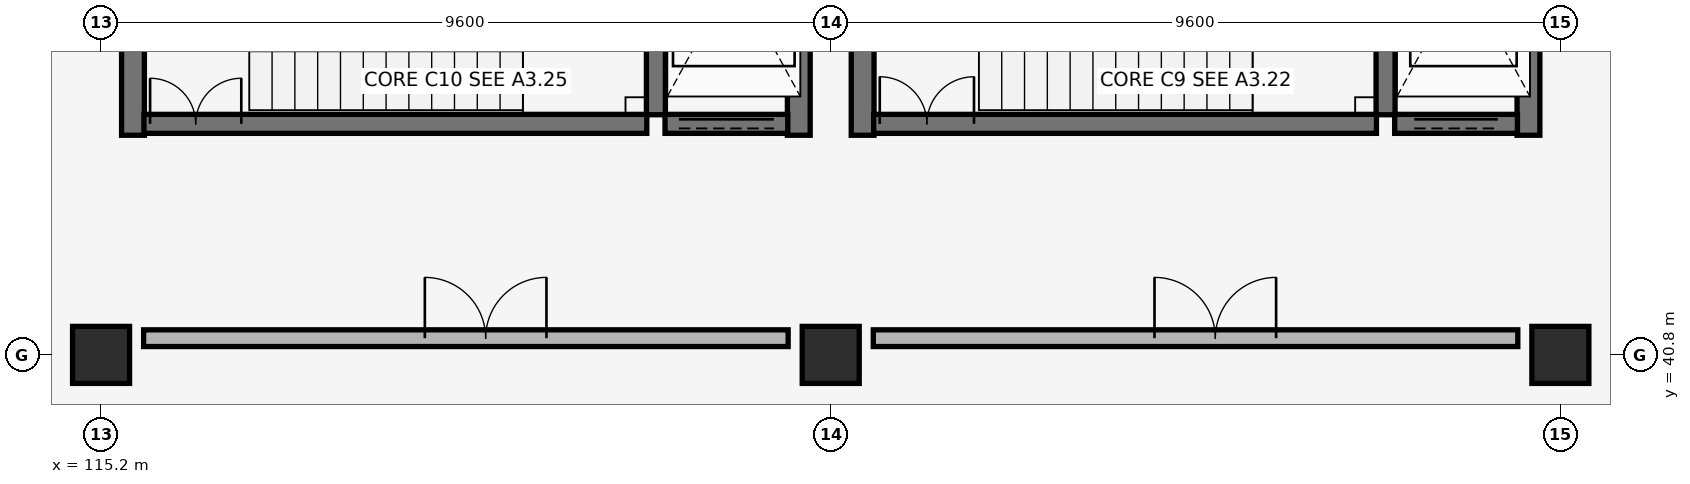
"""IFC4 building model, lengths in metres.
Left out: names, types, materials, properties, quantities, classifications, styles, units other than length and angle.
Written with IfcOpenShell. Run it as: python <this file> out.ifc"""

import sys

from ifc_helpers import new_model, si_unit, direction, frame, frame_2d, origin, origin_2d, place, context, subcontext, project, spatial, rectangle, circle, extrude, element, fill, save


model = new_model("IFC4")
c1 = context("Model", 3, precision=1e-05, world=origin(), true_north=direction((0.0, 1.0)))
c2 = subcontext(c1, "Body", "Model", "MODEL_VIEW")
j1 = project(units=[si_unit("LENGTHUNIT", "METRE"), si_unit("PLANEANGLEUNIT", "RADIAN")], contexts=[c1])
p1 = place(None, origin())
s1 = spatial("IfcSite", under=j1, at=p1, CompositionType="ELEMENT")
p2 = place(p1, origin())
s2 = spatial("IfcBuilding", under=s1, at=p2, CompositionType="ELEMENT")
p3 = place(p2, origin())
s3 = spatial("IfcBuildingStorey", under=s2, at=p3, CompositionType="ELEMENT", Elevation=0.0)
for number, where, z_axis, x_axis in (
    (1, (115.2, 40.8, -0.44), (0.0, 0.0, 1.0), (1.0, 0.0, 0.0)),
    (2, (124.8, 40.8, -0.44), (0.0, 0.0, 1.0), (1.0, 0.0, 0.0)),
    (3, (134.4, 40.8, -0.44), (0.0, 0.0, 1.0), (1.0, 0.0, 0.0)),
):
    element("IfcColumn", number, at=place(p3, frame(where, z_axis=z_axis, x_axis=x_axis)), inside=s3, PredefinedType="COLUMN", context=c2, shape_type="SweptSolid", body=[
        extrude(circle(Radius=0.375, at=origin_2d()), origin(), (0.0, 0.0, 1.0), 4.86),
    ])
for number, where, z_axis, x_axis in (
    (4, (125.22, 43.69, 0.0), (0.0, 0.0, 1.0), (0.0, 1.0, 0.0)),
    (5, (133.98, 43.69, 0.0), (0.0, 0.0, 1.0), (0.0, 1.0, 0.0)),
):
    element("IfcWall", number, at=place(p3, frame(where, z_axis=z_axis, x_axis=x_axis)), inside=s3, PredefinedType="SHEAR", context=c2, shape_type="SweptSolid", body=[
        extrude(rectangle(XDim=4.1, YDim=0.3, at=frame_2d((2.05, 0.0))), origin(), (0.0, 0.0, 1.0), 4.12),
    ])
p4 = place(p3, frame((132.1, 43.96, 0.0), z_axis=(0.0, 0.0, 1.0), x_axis=(0.0, 1.0, 0.0)))
e6 = element("IfcWall", 6, at=p4, inside=s3, PredefinedType="SHEAR", context=c2, shape_type="SweptSolid", body=[
    extrude(rectangle(XDim=3.53, YDim=0.25, at=frame_2d((1.765, 0.0))), origin(), (0.0, 0.0, 1.0), 4.12),
])
p5 = place(p3, frame((125.365, 43.84, 0.0), z_axis=(0.0, 0.0, 1.0), x_axis=(1.0, 0.0, 0.0)))
e7 = element("IfcWall", 7, at=p5, inside=s3, PredefinedType="SHEAR", context=c2, shape_type="SweptSolid", body=[
    extrude(rectangle(XDim=6.615, YDim=0.25, at=frame_2d((3.308, 0.0))), origin(), (0.0, 0.0, 1.0), 4.12),
])
p6 = place(p5, frame((0.08, 0.0, 0.0)))
e8 = element("IfcOpeningElement", 8, at=p6, cuts=e7, PredefinedType="OPENING", context=c2, shape_type="SweptSolid", body=[
    extrude(rectangle(XDim=1.24, YDim=2.15, at=frame_2d((0.62, 1.075))), frame((0.0, 0.135, 0.0), z_axis=(0.0, -1.0, 0.0), x_axis=(1.0, 0.0, 0.0)), (0.0, 0.0, 1.0), 0.27),
])
p7 = place(p3, frame((125.36, 41.02, 0.0), z_axis=(0.0, 0.0, 1.0), x_axis=(1.0, 0.0, 0.0)))
e9 = element("IfcWall", 9, at=p7, inside=s3, PredefinedType="PARTITIONING", context=c2, shape_type="SweptSolid", body=[
    extrude(rectangle(XDim=8.48, YDim=0.22, at=frame_2d((4.24, 0.0))), origin(), (0.0, 0.0, 1.0), 3.4),
])
p8 = place(p7, frame((3.7, 0.0, 0.0)))
e10 = element("IfcOpeningElement", 10, at=p8, cuts=e9, PredefinedType="OPENING", context=c2, shape_type="SweptSolid", body=[
    extrude(rectangle(XDim=1.6, YDim=2.2, at=frame_2d((0.8, 1.1))), frame((0.0, 0.12, 0.0), z_axis=(0.0, -1.0, 0.0), x_axis=(1.0, 0.0, 0.0)), (0.0, 0.0, 1.0), 0.24),
])
p9 = place(p3, frame((132.22, 43.84, 0.0), z_axis=(0.0, 0.0, 1.0), x_axis=(1.0, 0.0, 0.0)))
e11 = element("IfcWall", 11, at=p9, inside=s3, PredefinedType="SHEAR", context=c2, shape_type="SweptSolid", body=[
    extrude(rectangle(XDim=1.615, YDim=0.25, at=frame_2d((0.808, 0.0))), origin(), (0.0, 0.0, 1.0), 4.12),
])
p10 = place(p9, frame((0.258, 0.0, 0.0)))
e12 = element("IfcOpeningElement", 12, at=p10, cuts=e11, PredefinedType="OPENING", context=c2, shape_type="SweptSolid", body=[
    extrude(rectangle(XDim=1.1, YDim=2.15, at=frame_2d((0.55, 1.075))), frame((0.0, 0.135, 0.0), z_axis=(0.0, -1.0, 0.0), x_axis=(1.0, 0.0, 0.0)), (0.0, 0.0, 1.0), 0.27),
])
for number, where, z_axis, x_axis in (
    (13, (115.62, 43.69, 0.0), (0.0, 0.0, 1.0), (0.0, 1.0, 0.0)),
    (14, (124.38, 43.69, 0.0), (0.0, 0.0, 1.0), (0.0, 1.0, 0.0)),
):
    element("IfcWall", number, at=place(p3, frame(where, z_axis=z_axis, x_axis=x_axis)), inside=s3, PredefinedType="SHEAR", context=c2, shape_type="SweptSolid", body=[
        extrude(rectangle(XDim=4.1, YDim=0.3, at=frame_2d((2.05, 0.0))), origin(), (0.0, 0.0, 1.0), 4.12),
    ])
p11 = place(p3, frame((122.5, 43.96, 0.0), z_axis=(0.0, 0.0, 1.0), x_axis=(0.0, 1.0, 0.0)))
e15 = element("IfcWall", 15, at=p11, inside=s3, PredefinedType="SHEAR", context=c2, shape_type="SweptSolid", body=[
    extrude(rectangle(XDim=3.53, YDim=0.25, at=frame_2d((1.765, 0.0))), origin(), (0.0, 0.0, 1.0), 4.12),
])
p12 = place(p3, frame((115.765, 43.84, 0.0), z_axis=(0.0, 0.0, 1.0), x_axis=(1.0, 0.0, 0.0)))
e16 = element("IfcWall", 16, at=p12, inside=s3, PredefinedType="SHEAR", context=c2, shape_type="SweptSolid", body=[
    extrude(rectangle(XDim=6.615, YDim=0.25, at=frame_2d((3.308, 0.0))), origin(), (0.0, 0.0, 1.0), 4.12),
])
p13 = place(p12, frame((0.08, 0.0, 0.0)))
e17 = element("IfcOpeningElement", 17, at=p13, cuts=e16, PredefinedType="OPENING", context=c2, shape_type="SweptSolid", body=[
    extrude(rectangle(XDim=1.2, YDim=2.15, at=frame_2d((0.6, 1.075))), frame((0.0, 0.135, 0.0), z_axis=(0.0, -1.0, 0.0), x_axis=(1.0, 0.0, 0.0)), (0.0, 0.0, 1.0), 0.27),
])
p14 = place(p3, frame((115.76, 41.02, 0.0), z_axis=(0.0, 0.0, 1.0), x_axis=(1.0, 0.0, 0.0)))
e18 = element("IfcWall", 18, at=p14, inside=s3, PredefinedType="PARTITIONING", context=c2, shape_type="SweptSolid", body=[
    extrude(rectangle(XDim=8.48, YDim=0.22, at=frame_2d((4.24, 0.0))), origin(), (0.0, 0.0, 1.0), 3.4),
])
p15 = place(p14, frame((3.7, 0.0, 0.0)))
e19 = element("IfcOpeningElement", 19, at=p15, cuts=e18, PredefinedType="OPENING", context=c2, shape_type="SweptSolid", body=[
    extrude(rectangle(XDim=1.6, YDim=2.2, at=frame_2d((0.8, 1.1))), frame((0.0, 0.12, 0.0), z_axis=(0.0, -1.0, 0.0), x_axis=(1.0, 0.0, 0.0)), (0.0, 0.0, 1.0), 0.24),
])
p16 = place(p3, frame((122.62, 43.84, 0.0), z_axis=(0.0, 0.0, 1.0), x_axis=(1.0, 0.0, 0.0)))
e20 = element("IfcWall", 20, at=p16, inside=s3, PredefinedType="SHEAR", context=c2, shape_type="SweptSolid", body=[
    extrude(rectangle(XDim=1.615, YDim=0.25, at=frame_2d((0.808, 0.0))), origin(), (0.0, 0.0, 1.0), 4.12),
])
p17 = place(p16, frame((0.183, 0.0, 0.0)))
e21 = element("IfcOpeningElement", 21, at=p17, cuts=e20, PredefinedType="OPENING", context=c2, shape_type="SweptSolid", body=[
    extrude(rectangle(XDim=1.25, YDim=2.15, at=frame_2d((0.625, 1.075))), frame((0.0, 0.135, 0.0), z_axis=(0.0, -1.0, 0.0), x_axis=(1.0, 0.0, 0.0)), (0.0, 0.0, 1.0), 0.27),
])
p18 = place(p6, origin())
e22 = element("IfcDoor", 22, at=p18, inside=s3, OperationType="DOUBLE_DOOR_SINGLE_SWING", PredefinedType="DOOR", context=c2, shape_type="SweptSolid", body=[
    extrude(rectangle(XDim=1.24, YDim=2.15, at=frame_2d((0.62, 1.075))), frame((0.0, 0.025, 0.0), z_axis=(0.0, -1.0, 0.0), x_axis=(1.0, 0.0, 0.0)), (0.0, 0.0, 1.0), 0.05),
])
fill(e8, e22)
p19 = place(p8, origin())
e23 = element("IfcDoor", 23, at=p19, inside=s3, OperationType="DOUBLE_DOOR_SINGLE_SWING", PredefinedType="DOOR", context=c2, shape_type="SweptSolid", body=[
    extrude(rectangle(XDim=1.6, YDim=2.2, at=frame_2d((0.8, 1.1))), frame((0.0, 0.025, 0.0), z_axis=(0.0, -1.0, 0.0), x_axis=(1.0, 0.0, 0.0)), (0.0, 0.0, 1.0), 0.05),
])
fill(e10, e23)
p20 = place(p10, origin())
e24 = element("IfcDoor", 24, at=p20, inside=s3, OperationType="DOUBLE_DOOR_SLIDING", PredefinedType="DOOR", context=c2, shape_type="SweptSolid", body=[
    extrude(rectangle(XDim=1.1, YDim=2.15, at=frame_2d((0.55, 1.075))), frame((0.0, 0.025, 0.0), z_axis=(0.0, -1.0, 0.0), x_axis=(1.0, 0.0, 0.0)), (0.0, 0.0, 1.0), 0.05),
])
fill(e12, e24)
p21 = place(p13, origin())
e25 = element("IfcDoor", 25, at=p21, inside=s3, OperationType="DOUBLE_DOOR_SINGLE_SWING", PredefinedType="DOOR", context=c2, shape_type="SweptSolid", body=[
    extrude(rectangle(XDim=1.2, YDim=2.15, at=frame_2d((0.6, 1.075))), frame((0.0, 0.025, 0.0), z_axis=(0.0, -1.0, 0.0), x_axis=(1.0, 0.0, 0.0)), (0.0, 0.0, 1.0), 0.05),
])
fill(e17, e25)
p22 = place(p15, origin())
e26 = element("IfcDoor", 26, at=p22, inside=s3, OperationType="DOUBLE_DOOR_SINGLE_SWING", PredefinedType="DOOR", context=c2, shape_type="SweptSolid", body=[
    extrude(rectangle(XDim=1.6, YDim=2.2, at=frame_2d((0.8, 1.1))), frame((0.0, 0.025, 0.0), z_axis=(0.0, -1.0, 0.0), x_axis=(1.0, 0.0, 0.0)), (0.0, 0.0, 1.0), 0.05),
])
fill(e19, e26)
p23 = place(p17, origin())
e27 = element("IfcDoor", 27, at=p23, inside=s3, OperationType="DOUBLE_DOOR_SLIDING", PredefinedType="DOOR", context=c2, shape_type="SweptSolid", body=[
    extrude(rectangle(XDim=1.25, YDim=2.15, at=frame_2d((0.625, 1.075))), frame((0.0, 0.025, 0.0), z_axis=(0.0, -1.0, 0.0), x_axis=(1.0, 0.0, 0.0)), (0.0, 0.0, 1.0), 0.05),
])
fill(e21, e27)
save(model, sys.argv[1])
